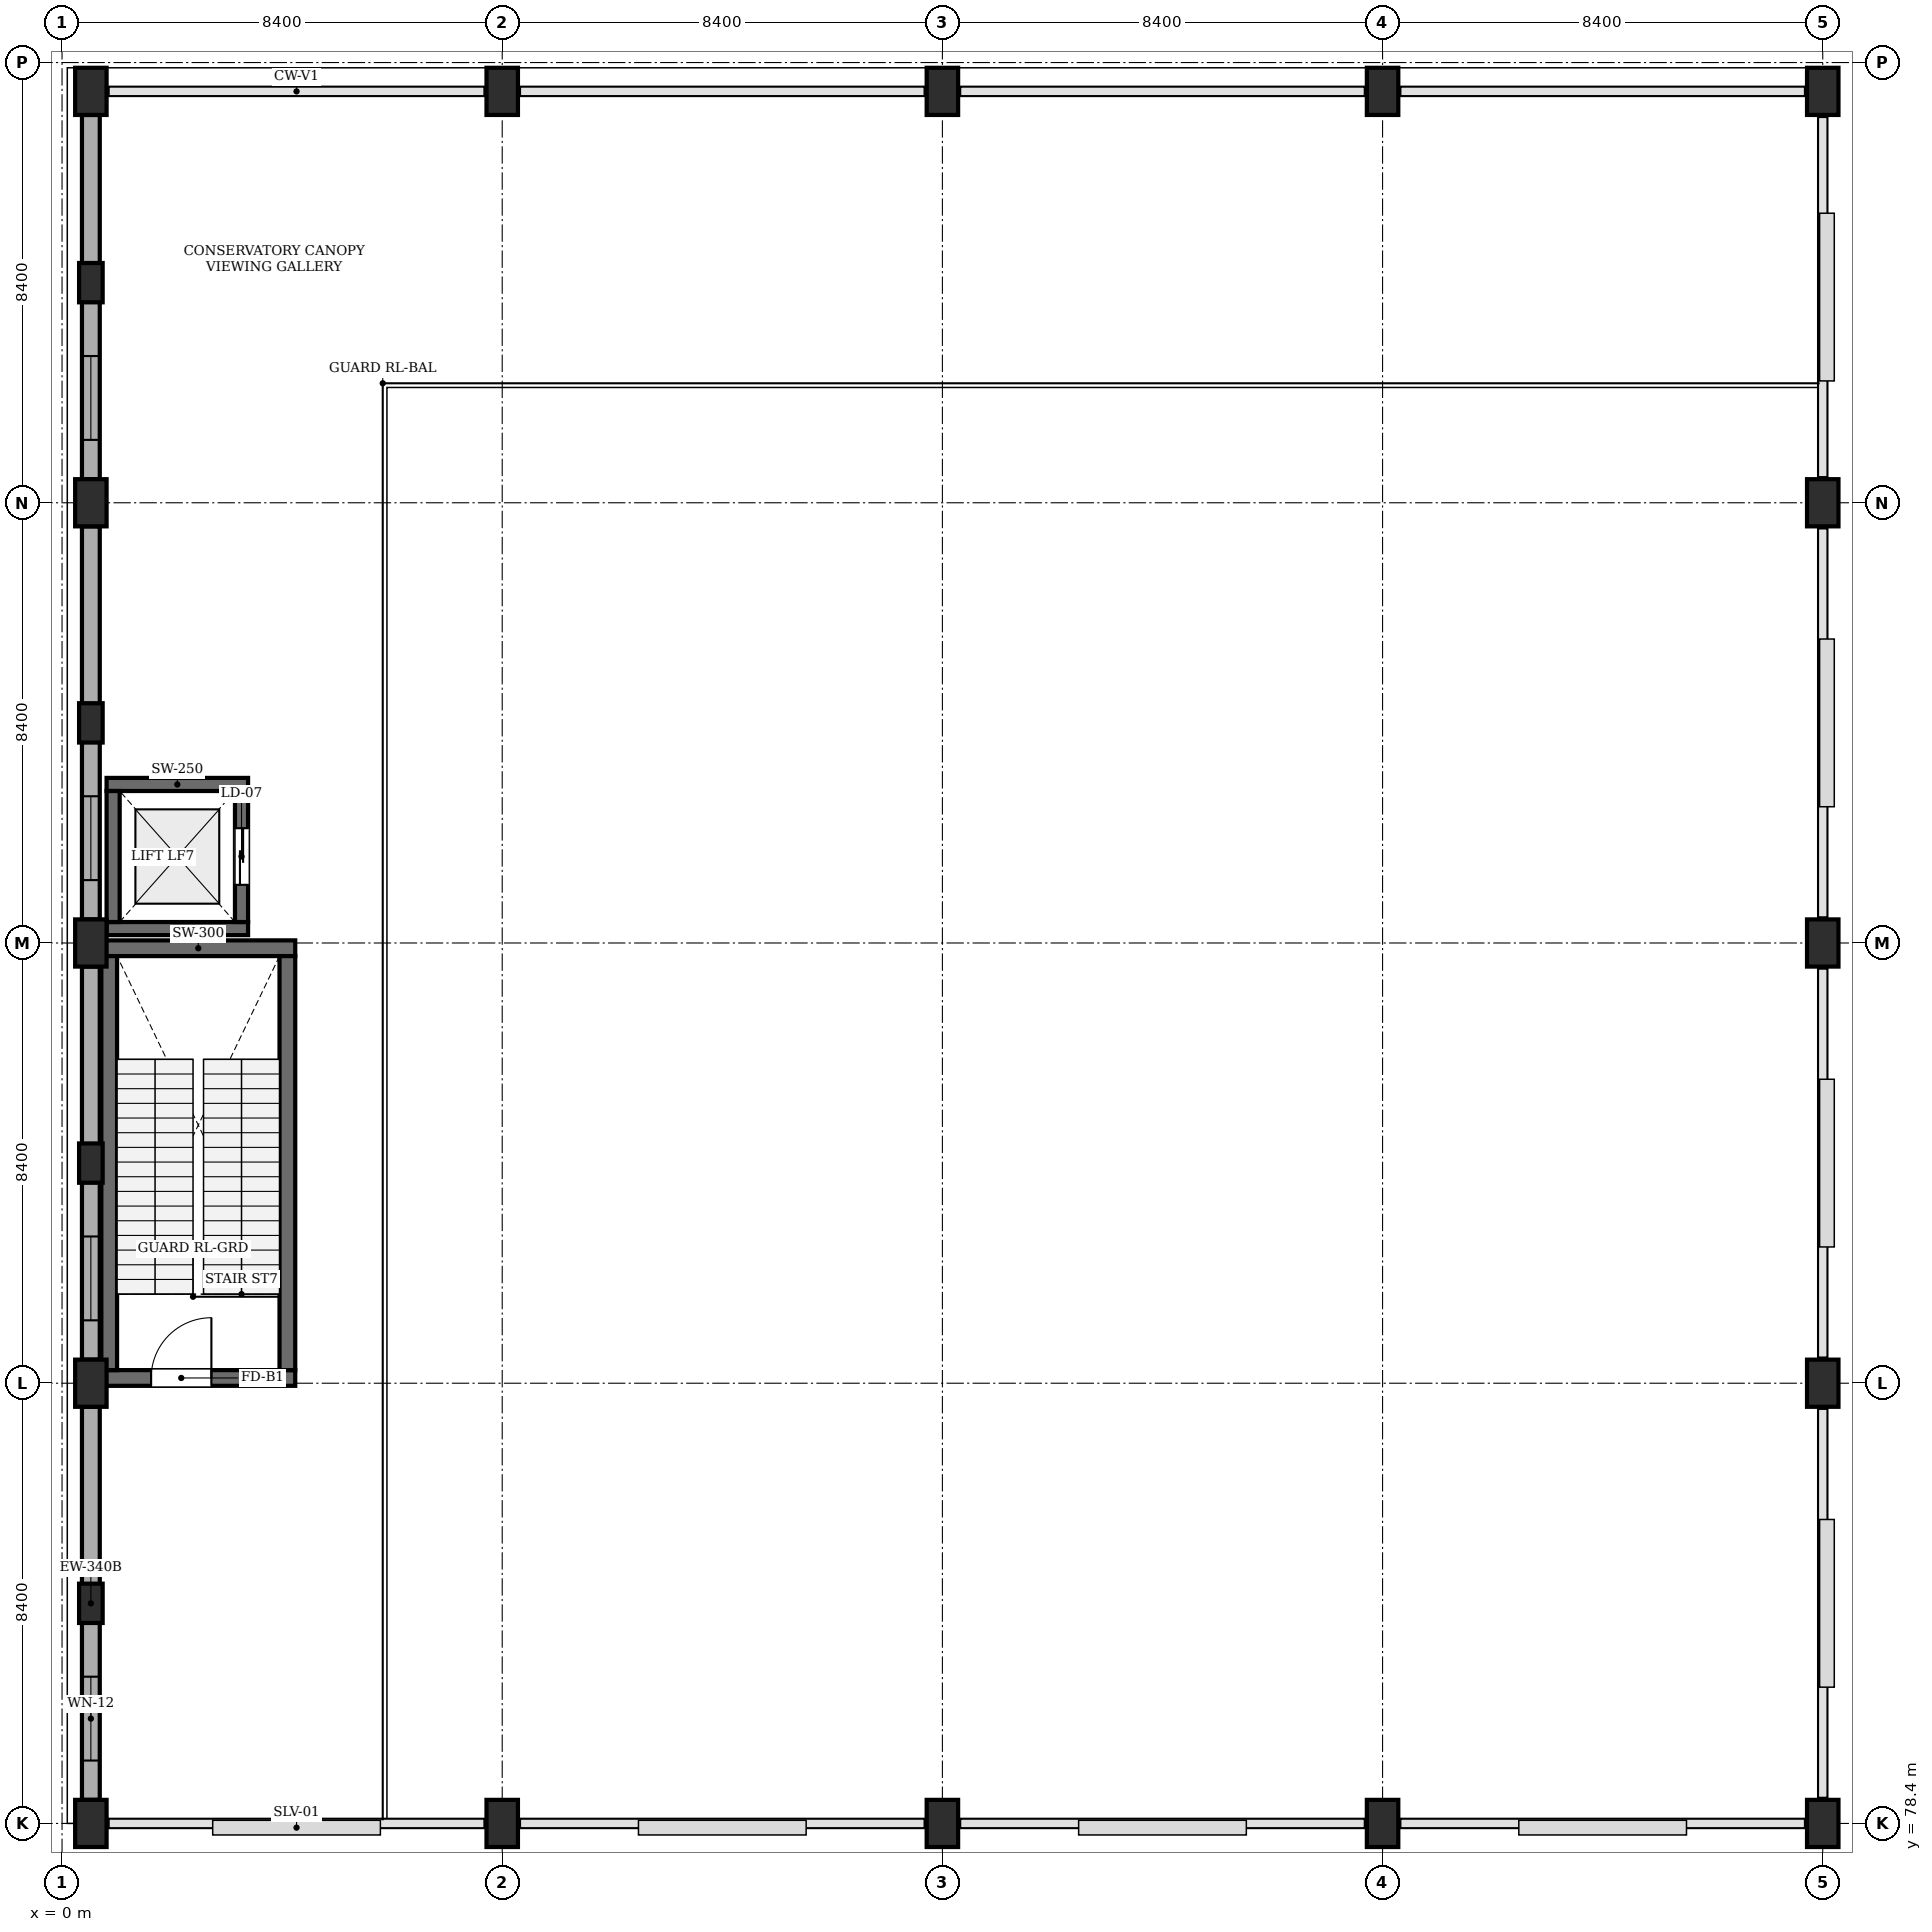
"""IFC4 building model, lengths in metres.
Left out: names, types, materials, properties, quantities, classifications, styles, units other than length and angle.
Written with IfcOpenShell. Run it as: python <this file> out.ifc"""

import sys

from ifc_helpers import new_model, si_unit, direction, frame, frame_2d, origin, origin_2d, place, context, subcontext, project, spatial, rectangle, extrude, element, fill, save


model = new_model("IFC4")
c1 = context("Model", 3, precision=1e-05, world=origin(), true_north=direction((0.0, 1.0)))
c2 = subcontext(c1, "Body", "Model", "MODEL_VIEW")
j1 = project(units=[si_unit("LENGTHUNIT", "METRE"), si_unit("PLANEANGLEUNIT", "RADIAN")], contexts=[c1])
p1 = place(None, origin())
s1 = spatial("IfcSite", under=j1, at=p1, CompositionType="ELEMENT")
p2 = place(p1, origin())
s2 = spatial("IfcBuilding", under=s1, at=p2, CompositionType="ELEMENT")
p3 = place(p2, frame((0.0, 0.0, 5.4)))
s3 = spatial("IfcBuildingStorey", under=s2, at=p3, CompositionType="ELEMENT", Elevation=5.4)
for number, where, z_axis, x_axis in (
    (1, (0.55, 78.4, 0.0), (0.0, 0.0, 1.0), (1.0, 0.0, 0.0)),
    (2, (0.55, 86.8, 0.0), (0.0, 0.0, 1.0), (1.0, 0.0, 0.0)),
    (3, (0.55, 95.2, 0.0), (0.0, 0.0, 1.0), (1.0, 0.0, 0.0)),
    (4, (0.55, 103.6, 0.0), (0.0, 0.0, 1.0), (1.0, 0.0, 0.0)),
    (5, (0.55, 111.45, 0.0), (0.0, 0.0, 1.0), (1.0, 0.0, 0.0)),
    (6, (8.4, 78.4, 0.0), (0.0, 0.0, 1.0), (1.0, 0.0, 0.0)),
    (7, (8.4, 111.45, 0.0), (0.0, 0.0, 1.0), (1.0, 0.0, 0.0)),
    (8, (16.8, 78.4, 0.0), (0.0, 0.0, 1.0), (1.0, 0.0, 0.0)),
    (9, (16.8, 111.45, 0.0), (0.0, 0.0, 1.0), (1.0, 0.0, 0.0)),
    (10, (25.2, 78.4, 0.0), (0.0, 0.0, 1.0), (1.0, 0.0, 0.0)),
    (11, (25.2, 111.45, 0.0), (0.0, 0.0, 1.0), (1.0, 0.0, 0.0)),
    (12, (33.6, 78.4, 0.0), (0.0, 0.0, 1.0), (1.0, 0.0, 0.0)),
    (13, (33.6, 86.8, 0.0), (0.0, 0.0, 1.0), (1.0, 0.0, 0.0)),
    (14, (33.6, 95.2, 0.0), (0.0, 0.0, 1.0), (1.0, 0.0, 0.0)),
    (15, (33.6, 103.6, 0.0), (0.0, 0.0, 1.0), (1.0, 0.0, 0.0)),
    (16, (33.6, 111.45, 0.0), (0.0, 0.0, 1.0), (1.0, 0.0, 0.0)),
):
    element("IfcColumn", number, at=place(p3, frame(where, z_axis=z_axis, x_axis=x_axis)), inside=s3, PredefinedType="COLUMN", context=c2, shape_type="SweptSolid", body=[
        extrude(rectangle(XDim=0.6, YDim=0.9, at=origin_2d()), origin(), (0.0, 0.0, 1.0), 3.9),
    ])
for number, where, z_axis, x_axis in (
    (17, (0.55, 82.6, 0.0), (0.0, 0.0, 1.0), (1.0, 0.0, 0.0)),
    (18, (0.55, 91.0, 0.0), (0.0, 0.0, 1.0), (1.0, 0.0, 0.0)),
    (19, (0.55, 99.4, 0.0), (0.0, 0.0, 1.0), (1.0, 0.0, 0.0)),
    (20, (0.55, 107.8, 0.0), (0.0, 0.0, 1.0), (1.0, 0.0, 0.0)),
):
    element("IfcColumn", number, at=place(p3, frame(where, z_axis=z_axis, x_axis=x_axis)), inside=s3, PredefinedType="PILASTER", context=c2, shape_type="SweptSolid", body=[
        extrude(rectangle(XDim=0.45, YDim=0.75, at=origin_2d()), origin(), (0.0, 0.0, 1.0), 3.9),
    ])
p4 = place(p3, frame((0.75, 86.9, 0.0), z_axis=(0.0, 0.0, 1.0), x_axis=(1.0, 0.0, 0.0)))
e21 = element("IfcWall", 21, at=p4, inside=s3, PredefinedType="SHEAR", context=c2, shape_type="SweptSolid", body=[
    extrude(rectangle(XDim=3.7, YDim=0.3, at=frame_2d((1.85, 0.0))), origin(), (0.0, 0.0, 1.0), 3.9),
])
p5 = place(p4, frame((0.95, 0.0, 0.0)))
e22 = element("IfcOpeningElement", 22, at=p5, cuts=e21, PredefinedType="OPENING", context=c2, shape_type="SweptSolid", body=[
    extrude(rectangle(XDim=1.15, YDim=2.15, at=frame_2d((0.575, 1.075))), frame((0.0, 0.16, 0.0), z_axis=(0.0, -1.0, 0.0), x_axis=(1.0, 0.0, 0.0)), (0.0, 0.0, 1.0), 0.32),
])
p6 = place(p3, frame((0.75, 95.1, 0.0), z_axis=(0.0, 0.0, 1.0), x_axis=(1.0, 0.0, 0.0)))
e23 = element("IfcWall", 23, at=p6, inside=s3, PredefinedType="SHEAR", context=c2, shape_type="SweptSolid", body=[
    extrude(rectangle(XDim=3.7, YDim=0.3, at=frame_2d((1.85, 0.0))), origin(), (0.0, 0.0, 1.0), 3.9),
])
for number, where, z_axis, x_axis in (
    (24, (0.9, 87.05, 0.0), (0.0, 0.0, 1.0), (0.0, 1.0, 0.0)),
    (25, (4.3, 87.05, 0.0), (0.0, 0.0, 1.0), (0.0, 1.0, 0.0)),
):
    element("IfcWall", number, at=place(p3, frame(where, z_axis=z_axis, x_axis=x_axis)), inside=s3, PredefinedType="SHEAR", context=c2, shape_type="SweptSolid", body=[
        extrude(rectangle(XDim=7.9, YDim=0.3, at=frame_2d((3.95, 0.0))), origin(), (0.0, 0.0, 1.0), 3.9),
    ])
for number, where, z_axis, x_axis in (
    (26, (0.85, 95.475, 0.0), (0.0, 0.0, 1.0), (1.0, 0.0, 0.0)),
    (27, (0.85, 98.225, 0.0), (0.0, 0.0, 1.0), (1.0, 0.0, 0.0)),
):
    element("IfcWall", number, at=place(p3, frame(where, z_axis=z_axis, x_axis=x_axis)), inside=s3, PredefinedType="SHEAR", context=c2, shape_type="SweptSolid", body=[
        extrude(rectangle(XDim=2.7, YDim=0.25, at=frame_2d((1.35, 0.0))), origin(), (0.0, 0.0, 1.0), 3.9),
    ])
p7 = place(p3, frame((0.975, 95.6, 0.0), z_axis=(0.0, 0.0, 1.0), x_axis=(0.0, 1.0, 0.0)))
e28 = element("IfcWall", 28, at=p7, inside=s3, PredefinedType="SHEAR", context=c2, shape_type="SweptSolid", body=[
    extrude(rectangle(XDim=2.5, YDim=0.25, at=frame_2d((1.25, 0.0))), origin(), (0.0, 0.0, 1.0), 3.9),
])
p8 = place(p3, frame((3.425, 95.6, 0.0), z_axis=(0.0, 0.0, 1.0), x_axis=(0.0, 1.0, 0.0)))
e29 = element("IfcWall", 29, at=p8, inside=s3, PredefinedType="SHEAR", context=c2, shape_type="SweptSolid", body=[
    extrude(rectangle(XDim=2.5, YDim=0.25, at=frame_2d((1.25, 0.0))), origin(), (0.0, 0.0, 1.0), 3.9),
])
p9 = place(p8, frame((0.71, 0.0, 0.0)))
e30 = element("IfcOpeningElement", 30, at=p9, cuts=e29, PredefinedType="OPENING", context=c2, shape_type="SweptSolid", body=[
    extrude(rectangle(XDim=1.08, YDim=2.18, at=frame_2d((0.54, 1.09))), frame((0.0, 0.135, 0.0), z_axis=(0.0, -1.0, 0.0), x_axis=(1.0, 0.0, 0.0)), (0.0, 0.0, 1.0), 0.27),
])
p10 = place(p3, frame((0.55, 78.85, 0.0), z_axis=(0.0, 0.0, 1.0), x_axis=(0.0, 1.0, 0.0)))
e31 = element("IfcWall", 31, at=p10, inside=s3, PredefinedType="STANDARD", context=c2, shape_type="SweptSolid", body=[
    extrude(rectangle(XDim=7.5, YDim=0.34, at=frame_2d((3.75, 0.0))), origin(), (0.0, 0.0, 1.0), 3.9),
])
p11 = place(p10, frame((0.75, 0.0, 1.0)))
e32 = element("IfcOpeningElement", 32, at=p11, cuts=e31, PredefinedType="OPENING", context=c2, shape_type="SweptSolid", body=[
    extrude(rectangle(XDim=1.6, YDim=2.0, at=frame_2d((0.8, 1.0))), frame((0.0, 0.18, 0.0), z_axis=(0.0, -1.0, 0.0), x_axis=(1.0, 0.0, 0.0)), (0.0, 0.0, 1.0), 0.36),
])
p12 = place(p3, frame((0.55, 87.25, 0.0), z_axis=(0.0, 0.0, 1.0), x_axis=(0.0, 1.0, 0.0)))
e33 = element("IfcWall", 33, at=p12, inside=s3, PredefinedType="STANDARD", context=c2, shape_type="SweptSolid", body=[
    extrude(rectangle(XDim=7.5, YDim=0.34, at=frame_2d((3.75, 0.0))), origin(), (0.0, 0.0, 1.0), 3.9),
])
p13 = place(p12, frame((0.75, 0.0, 1.0)))
e34 = element("IfcOpeningElement", 34, at=p13, cuts=e33, PredefinedType="OPENING", context=c2, shape_type="SweptSolid", body=[
    extrude(rectangle(XDim=1.6, YDim=2.0, at=frame_2d((0.8, 1.0))), frame((0.0, 0.18, 0.0), z_axis=(0.0, -1.0, 0.0), x_axis=(1.0, 0.0, 0.0)), (0.0, 0.0, 1.0), 0.36),
])
p14 = place(p3, frame((0.55, 95.65, 0.0), z_axis=(0.0, 0.0, 1.0), x_axis=(0.0, 1.0, 0.0)))
e35 = element("IfcWall", 35, at=p14, inside=s3, PredefinedType="STANDARD", context=c2, shape_type="SweptSolid", body=[
    extrude(rectangle(XDim=7.5, YDim=0.34, at=frame_2d((3.75, 0.0))), origin(), (0.0, 0.0, 1.0), 3.9),
])
p15 = place(p14, frame((0.75, 0.0, 1.0)))
e36 = element("IfcOpeningElement", 36, at=p15, cuts=e35, PredefinedType="OPENING", context=c2, shape_type="SweptSolid", body=[
    extrude(rectangle(XDim=1.6, YDim=2.0, at=frame_2d((0.8, 1.0))), frame((0.0, 0.18, 0.0), z_axis=(0.0, -1.0, 0.0), x_axis=(1.0, 0.0, 0.0)), (0.0, 0.0, 1.0), 0.36),
])
p16 = place(p3, frame((0.55, 104.05, 0.0), z_axis=(0.0, 0.0, 1.0), x_axis=(0.0, 1.0, 0.0)))
e37 = element("IfcWall", 37, at=p16, inside=s3, PredefinedType="STANDARD", context=c2, shape_type="SweptSolid", body=[
    extrude(rectangle(XDim=6.95, YDim=0.34, at=frame_2d((3.475, 0.0))), origin(), (0.0, 0.0, 1.0), 3.9),
])
p17 = place(p16, frame((0.75, 0.0, 1.0)))
e38 = element("IfcOpeningElement", 38, at=p17, cuts=e37, PredefinedType="OPENING", context=c2, shape_type="SweptSolid", body=[
    extrude(rectangle(XDim=1.6, YDim=2.0, at=frame_2d((0.8, 1.0))), frame((0.0, 0.18, 0.0), z_axis=(0.0, -1.0, 0.0), x_axis=(1.0, 0.0, 0.0)), (0.0, 0.0, 1.0), 0.36),
])
p18 = place(p11, origin())
e39 = element("IfcWindow", 39, at=p18, inside=s3, PartitioningType="DOUBLE_PANEL_VERTICAL", PredefinedType="WINDOW", context=c2, shape_type="SweptSolid", body=[
    extrude(rectangle(XDim=1.6, YDim=2.0, at=frame_2d((0.8, 1.0))), frame((0.0, 0.03, 0.0), z_axis=(0.0, -1.0, 0.0), x_axis=(1.0, 0.0, 0.0)), (0.0, 0.0, 1.0), 0.06),
])
fill(e32, e39)
p19 = place(p13, origin())
e40 = element("IfcWindow", 40, at=p19, inside=s3, PartitioningType="DOUBLE_PANEL_VERTICAL", PredefinedType="WINDOW", context=c2, shape_type="SweptSolid", body=[
    extrude(rectangle(XDim=1.6, YDim=2.0, at=frame_2d((0.8, 1.0))), frame((0.0, 0.03, 0.0), z_axis=(0.0, -1.0, 0.0), x_axis=(1.0, 0.0, 0.0)), (0.0, 0.0, 1.0), 0.06),
])
fill(e34, e40)
p20 = place(p15, origin())
e41 = element("IfcWindow", 41, at=p20, inside=s3, PartitioningType="DOUBLE_PANEL_VERTICAL", PredefinedType="WINDOW", context=c2, shape_type="SweptSolid", body=[
    extrude(rectangle(XDim=1.6, YDim=2.0, at=frame_2d((0.8, 1.0))), frame((0.0, 0.03, 0.0), z_axis=(0.0, -1.0, 0.0), x_axis=(1.0, 0.0, 0.0)), (0.0, 0.0, 1.0), 0.06),
])
fill(e36, e41)
p21 = place(p17, origin())
e42 = element("IfcWindow", 42, at=p21, inside=s3, PartitioningType="DOUBLE_PANEL_VERTICAL", PredefinedType="WINDOW", context=c2, shape_type="SweptSolid", body=[
    extrude(rectangle(XDim=1.6, YDim=2.0, at=frame_2d((0.8, 1.0))), frame((0.0, 0.03, 0.0), z_axis=(0.0, -1.0, 0.0), x_axis=(1.0, 0.0, 0.0)), (0.0, 0.0, 1.0), 0.06),
])
fill(e38, e42)
p22 = place(p5, origin())
e43 = element("IfcDoor", 43, at=p22, inside=s3, OperationType="SINGLE_SWING_RIGHT", PredefinedType="DOOR", context=c2, shape_type="SweptSolid", body=[
    extrude(rectangle(XDim=1.15, YDim=2.15, at=frame_2d((0.575, 1.075))), frame((0.0, 0.025, 0.0), z_axis=(0.0, -1.0, 0.0), x_axis=(1.0, 0.0, 0.0)), (0.0, 0.0, 1.0), 0.05),
])
fill(e22, e43)
p23 = place(p9, origin())
e44 = element("IfcDoor", 44, at=p23, inside=s3, OperationType="SLIDING_TO_LEFT", PredefinedType="DOOR", context=c2, shape_type="SweptSolid", body=[
    extrude(rectangle(XDim=1.08, YDim=2.18, at=frame_2d((0.54, 1.09))), frame((0.0, 0.025, 0.0), z_axis=(0.0, -1.0, 0.0), x_axis=(1.0, 0.0, 0.0)), (0.0, 0.0, 1.0), 0.05),
])
fill(e30, e44)
save(model, sys.argv[1])
